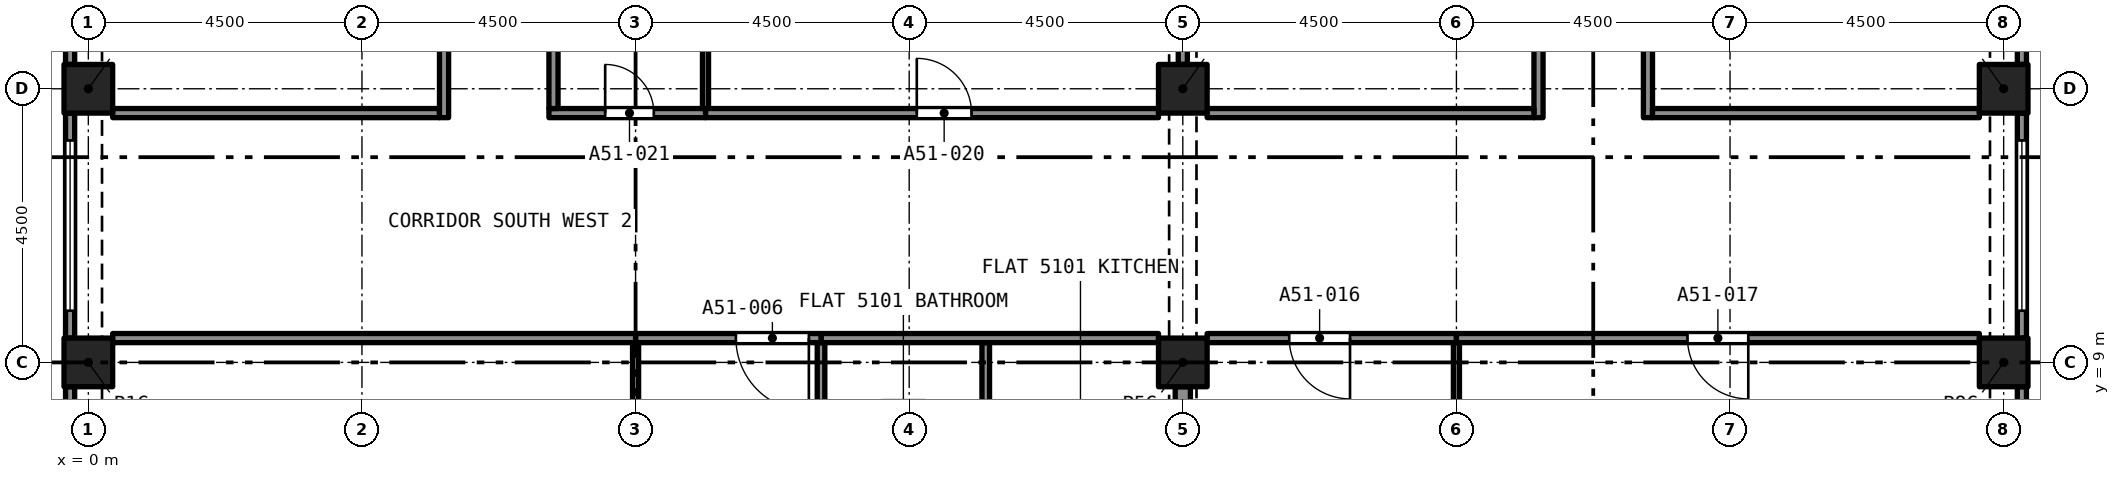
"""IFC4 building model, lengths in metres.
Left out: names, types, materials, properties, quantities, classifications, styles, units other than length and angle.
Written with IfcOpenShell. Run it as: python <this file> out.ifc"""

import sys

from ifc_helpers import new_model, si_unit, direction, frame, frame_2d, origin, origin_2d, place, context, subcontext, project, spatial, rectangle, extrude, element, fill, save


model = new_model("IFC4")
c1 = context("Model", 3, precision=1e-05, world=origin(), true_north=direction((0.0, 1.0)))
c2 = subcontext(c1, "Body", "Model", "MODEL_VIEW")
j1 = project(units=[si_unit("LENGTHUNIT", "METRE"), si_unit("PLANEANGLEUNIT", "RADIAN")], contexts=[c1])
p1 = place(None, origin())
s1 = spatial("IfcSite", under=j1, at=p1, CompositionType="ELEMENT")
p2 = place(p1, origin())
s2 = spatial("IfcBuilding", under=s1, at=p2, CompositionType="ELEMENT")
p3 = place(p2, frame((0.0, 0.0, 185.9)))
s3 = spatial("IfcBuildingStorey", under=s2, at=p3, CompositionType="ELEMENT", Elevation=185.9)
for number, where, z_axis, x_axis in (
    (1, (0.0, 9.0, 0.0), (0.0, 0.0, 1.0), (1.0, 0.0, 0.0)),
    (2, (18.0, 9.0, 0.0), (0.0, 0.0, 1.0), (1.0, 0.0, 0.0)),
    (3, (31.5, 9.0, 0.0), (0.0, 0.0, 1.0), (1.0, 0.0, 0.0)),
    (4, (0.0, 13.5, 0.0), (0.0, 0.0, 1.0), (1.0, 0.0, 0.0)),
    (5, (18.0, 13.5, 0.0), (0.0, 0.0, 1.0), (1.0, 0.0, 0.0)),
    (6, (31.5, 13.5, 0.0), (0.0, 0.0, 1.0), (1.0, 0.0, 0.0)),
):
    element("IfcColumn", number, at=place(p3, frame(where, z_axis=z_axis, x_axis=x_axis)), inside=s3, PredefinedType="COLUMN", context=c2, shape_type="SweptSolid", body=[
        extrude(rectangle(XDim=0.8, YDim=0.8, at=origin_2d()), origin(), (0.0, 0.0, 1.0), 3.2),
    ])
p4 = place(p3, frame((31.8, 8.6, 0.0), z_axis=(0.0, 0.0, 1.0), x_axis=(0.0, -1.0, 0.0)))
e7 = element("IfcWall", 7, at=p4, inside=s3, PredefinedType="SOLIDWALL", context=c2, shape_type="SweptSolid", body=[
    extrude(rectangle(XDim=3.7, YDim=0.15, at=frame_2d((1.85, 0.0))), origin(), (0.0, 0.0, 1.0), 3.2),
])
p5 = place(p4, frame((0.45, 0.0, 0.45)))
e8 = element("IfcOpeningElement", 8, at=p5, cuts=e7, PredefinedType="OPENING", context=c2, shape_type="SweptSolid", body=[
    extrude(rectangle(XDim=2.8, YDim=1.95, at=frame_2d((1.4, 0.975))), frame((0.0, 0.085, 0.0), z_axis=(0.0, -1.0, 0.0), x_axis=(1.0, 0.0, 0.0)), (0.0, 0.0, 1.0), 0.17),
])
p6 = place(p3, frame((31.8, 13.1, 0.0), z_axis=(0.0, 0.0, 1.0), x_axis=(0.0, -1.0, 0.0)))
e9 = element("IfcWall", 9, at=p6, inside=s3, PredefinedType="SOLIDWALL", context=c2, shape_type="SweptSolid", body=[
    extrude(rectangle(XDim=3.7, YDim=0.15, at=frame_2d((1.85, 0.0))), origin(), (0.0, 0.0, 1.0), 3.2),
])
p7 = place(p6, frame((0.45, 0.0, 0.45)))
e10 = element("IfcOpeningElement", 10, at=p7, cuts=e9, PredefinedType="OPENING", context=c2, shape_type="SweptSolid", body=[
    extrude(rectangle(XDim=2.8, YDim=1.95, at=frame_2d((1.4, 0.975))), frame((0.0, 0.085, 0.0), z_axis=(0.0, -1.0, 0.0), x_axis=(1.0, 0.0, 0.0)), (0.0, 0.0, 1.0), 0.17),
])
p8 = place(p3, frame((31.8, 17.6, 0.0), z_axis=(0.0, 0.0, 1.0), x_axis=(0.0, -1.0, 0.0)))
e11 = element("IfcWall", 11, at=p8, inside=s3, PredefinedType="SOLIDWALL", context=c2, shape_type="SweptSolid", body=[
    extrude(rectangle(XDim=3.7, YDim=0.15, at=frame_2d((1.85, 0.0))), origin(), (0.0, 0.0, 1.0), 3.2),
])
p9 = place(p8, frame((0.45, 0.0, 0.45)))
e12 = element("IfcOpeningElement", 12, at=p9, cuts=e11, PredefinedType="OPENING", context=c2, shape_type="SweptSolid", body=[
    extrude(rectangle(XDim=2.8, YDim=1.95, at=frame_2d((1.4, 0.975))), frame((0.0, 0.085, 0.0), z_axis=(0.0, -1.0, 0.0), x_axis=(1.0, 0.0, 0.0)), (0.0, 0.0, 1.0), 0.17),
])
p10 = place(p3, frame((-0.3, 13.9, 0.0), z_axis=(0.0, 0.0, 1.0), x_axis=(0.0, 1.0, 0.0)))
e13 = element("IfcWall", 13, at=p10, inside=s3, PredefinedType="SOLIDWALL", context=c2, shape_type="SweptSolid", body=[
    extrude(rectangle(XDim=3.7, YDim=0.15, at=frame_2d((1.85, 0.0))), origin(), (0.0, 0.0, 1.0), 3.2),
])
p11 = place(p10, frame((0.45, 0.0, 0.45)))
e14 = element("IfcOpeningElement", 14, at=p11, cuts=e13, PredefinedType="OPENING", context=c2, shape_type="SweptSolid", body=[
    extrude(rectangle(XDim=2.8, YDim=1.95, at=frame_2d((1.4, 0.975))), frame((0.0, 0.085, 0.0), z_axis=(0.0, -1.0, 0.0), x_axis=(1.0, 0.0, 0.0)), (0.0, 0.0, 1.0), 0.17),
])
p12 = place(p3, frame((-0.3, 9.4, 0.0), z_axis=(0.0, 0.0, 1.0), x_axis=(0.0, 1.0, 0.0)))
e15 = element("IfcWall", 15, at=p12, inside=s3, PredefinedType="SOLIDWALL", context=c2, shape_type="SweptSolid", body=[
    extrude(rectangle(XDim=3.7, YDim=0.15, at=frame_2d((1.85, 0.0))), origin(), (0.0, 0.0, 1.0), 3.2),
])
p13 = place(p12, frame((0.45, 0.0, 0.45)))
e16 = element("IfcOpeningElement", 16, at=p13, cuts=e15, PredefinedType="OPENING", context=c2, shape_type="SweptSolid", body=[
    extrude(rectangle(XDim=2.8, YDim=1.95, at=frame_2d((1.4, 0.975))), frame((0.0, 0.085, 0.0), z_axis=(0.0, -1.0, 0.0), x_axis=(1.0, 0.0, 0.0)), (0.0, 0.0, 1.0), 0.17),
])
p14 = place(p3, frame((-0.3, 4.9, 0.0), z_axis=(0.0, 0.0, 1.0), x_axis=(0.0, 1.0, 0.0)))
e17 = element("IfcWall", 17, at=p14, inside=s3, PredefinedType="SOLIDWALL", context=c2, shape_type="SweptSolid", body=[
    extrude(rectangle(XDim=3.7, YDim=0.15, at=frame_2d((1.85, 0.0))), origin(), (0.0, 0.0, 1.0), 3.2),
])
p15 = place(p14, frame((0.45, 0.0, 0.45)))
e18 = element("IfcOpeningElement", 18, at=p15, cuts=e17, PredefinedType="OPENING", context=c2, shape_type="SweptSolid", body=[
    extrude(rectangle(XDim=2.8, YDim=1.95, at=frame_2d((1.4, 0.975))), frame((0.0, 0.085, 0.0), z_axis=(0.0, -1.0, 0.0), x_axis=(1.0, 0.0, 0.0)), (0.0, 0.0, 1.0), 0.17),
])
for number, where, z_axis, x_axis in (
    (19, (12.05, 7.052, 0.0), (0.0, 0.0, 1.0), (0.0, 1.0, 0.0)),
    (20, (14.759, 7.052, 0.0), (0.0, 0.0, 1.0), (0.0, 1.0, 0.0)),
):
    element("IfcWall", number, at=place(p3, frame(where, z_axis=z_axis, x_axis=x_axis)), inside=s3, PredefinedType="PARTITIONING", context=c2, shape_type="SweptSolid", body=[
        extrude(rectangle(XDim=2.272, YDim=0.125, at=frame_2d((1.136, 0.0))), origin(), (0.0, 0.0, 1.0), 2.9),
    ])
p16 = place(p3, frame((12.05, 9.4, 0.0), z_axis=(0.0, 0.0, 1.0), x_axis=(1.0, 0.0, 0.0)))
e21 = element("IfcWall", 21, at=p16, inside=s3, PredefinedType="PARTITIONING", context=c2, shape_type="SweptSolid", body=[
    extrude(rectangle(XDim=5.55, YDim=0.15, at=frame_2d((2.775, 0.0))), origin(), (0.0, 0.0, 1.0), 2.9),
])
p17 = place(p3, frame((18.0, 4.9, 0.0), z_axis=(0.0, 0.0, 1.0), x_axis=(0.0, 1.0, 0.0)))
e22 = element("IfcWall", 22, at=p17, inside=s3, PredefinedType="PARTITIONING", context=c2, shape_type="SweptSolid", body=[
    extrude(rectangle(XDim=3.7, YDim=0.25, at=frame_2d((1.85, 0.0))), origin(), (0.0, 0.0, 1.0), 2.38),
])
p18 = place(p3, frame((9.0, 5.65, 0.0), z_axis=(0.0, 0.0, 1.0), x_axis=(0.0, 1.0, 0.0)))
e23 = element("IfcWall", 23, at=p18, inside=s3, PredefinedType="PARTITIONING", context=c2, shape_type="SweptSolid", body=[
    extrude(rectangle(XDim=3.675, YDim=0.1, at=frame_2d((1.837, 0.0))), origin(), (0.0, 0.0, 1.0), 2.9),
])
p19 = place(p18, frame((0.13, 0.0, 0.0)))
e24 = element("IfcOpeningElement", 24, at=p19, cuts=e23, PredefinedType="OPENING", context=c2, shape_type="SweptSolid", body=[
    extrude(rectangle(XDim=1.6, YDim=2.1, at=frame_2d((0.8, 1.05))), frame((0.0, 0.06, 0.0), z_axis=(0.0, -1.0, 0.0), x_axis=(1.0, 0.0, 0.0)), (0.0, 0.0, 1.0), 0.12),
])
p20 = place(p3, frame((12.05, 9.4, 0.0), z_axis=(0.0, 0.0, 1.0), x_axis=(-1.0, 0.0, 0.0)))
e25 = element("IfcWall", 25, at=p20, inside=s3, PredefinedType="PARTITIONING", context=c2, shape_type="SweptSolid", body=[
    extrude(rectangle(XDim=3.05, YDim=0.15, at=frame_2d((1.525, 0.0))), origin(), (0.0, 0.0, 1.0), 2.9),
])
p21 = place(p20, frame((0.2, 0.0, 0.0)))
e26 = element("IfcOpeningElement", 26, at=p21, cuts=e25, PredefinedType="OPENING", context=c2, shape_type="SweptSolid", body=[
    extrude(rectangle(XDim=1.2, YDim=2.4, at=frame_2d((0.6, 1.2))), frame((0.0, 0.085, 0.0), z_axis=(0.0, -1.0, 0.0), x_axis=(1.0, 0.0, 0.0)), (0.0, 0.0, 1.0), 0.17),
])
p22 = place(p3, frame((0.4, 9.4, 0.0), z_axis=(0.0, 0.0, 1.0), x_axis=(1.0, 0.0, 0.0)))
e27 = element("IfcWall", 27, at=p22, inside=s3, PredefinedType="PARTITIONING", context=c2, shape_type="SweptSolid", body=[
    extrude(rectangle(XDim=8.6, YDim=0.15, at=frame_2d((4.3, 0.0))), origin(), (0.0, 0.0, 1.0), 2.9),
])
p23 = place(p3, frame((22.5, 0.4, 0.0), z_axis=(0.0, 0.0, 1.0), x_axis=(0.0, 1.0, 0.0)))
e28 = element("IfcWall", 28, at=p23, inside=s3, PredefinedType="PARTITIONING", context=c2, shape_type="SweptSolid", body=[
    extrude(rectangle(XDim=8.925, YDim=0.1, at=frame_2d((4.462, 0.0))), origin(), (0.0, 0.0, 1.0), 2.75),
])
p24 = place(p3, frame((22.5, 9.4, 0.0), z_axis=(0.0, 0.0, 1.0), x_axis=(-1.0, 0.0, 0.0)))
e29 = element("IfcWall", 29, at=p24, inside=s3, PredefinedType="PARTITIONING", context=c2, shape_type="SweptSolid", body=[
    extrude(rectangle(XDim=4.1, YDim=0.15, at=frame_2d((2.05, 0.0))), origin(), (0.0, 0.0, 1.0), 2.75),
])
p25 = place(p24, frame((1.75, 0.0, 0.0)))
e30 = element("IfcOpeningElement", 30, at=p25, cuts=e29, PredefinedType="OPENING", context=c2, shape_type="SweptSolid", body=[
    extrude(rectangle(XDim=1.0, YDim=2.1, at=frame_2d((0.5, 1.05))), frame((0.0, 0.085, 0.0), z_axis=(0.0, -1.0, 0.0), x_axis=(1.0, 0.0, 0.0)), (0.0, 0.0, 1.0), 0.17),
])
p26 = place(p3, frame((31.1, 9.4, 0.0), z_axis=(0.0, 0.0, 1.0), x_axis=(-1.0, 0.0, 0.0)))
e31 = element("IfcWall", 31, at=p26, inside=s3, PredefinedType="PARTITIONING", context=c2, shape_type="SweptSolid", body=[
    extrude(rectangle(XDim=8.6, YDim=0.15, at=frame_2d((4.3, 0.0))), origin(), (0.0, 0.0, 1.0), 2.75),
])
p27 = place(p26, frame((3.8, 0.0, 0.0)))
e32 = element("IfcOpeningElement", 32, at=p27, cuts=e31, PredefinedType="OPENING", context=c2, shape_type="SweptSolid", body=[
    extrude(rectangle(XDim=1.0, YDim=2.1, at=frame_2d((0.5, 1.05))), frame((0.0, 0.085, 0.0), z_axis=(0.0, -1.0, 0.0), x_axis=(1.0, 0.0, 0.0)), (0.0, 0.0, 1.0), 0.17),
])
p28 = place(p3, frame((23.85, 13.025, 0.0), z_axis=(0.0, 0.0, 1.0), x_axis=(0.0, 1.0, 0.0)))
e33 = element("IfcWall", 33, at=p28, inside=s3, PredefinedType="PARTITIONING", context=c2, shape_type="SweptSolid", body=[
    extrude(rectangle(XDim=9.55, YDim=0.15, at=frame_2d((4.775, 0.0))), origin(), (0.0, 0.0, 1.0), 2.75),
])
p29 = place(p28, frame((4.275, 0.0, 0.0)))
e34 = element("IfcOpeningElement", 34, at=p29, cuts=e33, PredefinedType="OPENING", context=c2, shape_type="SweptSolid", body=[
    extrude(rectangle(XDim=1.0, YDim=2.1, at=frame_2d((0.5, 1.05))), frame((0.0, 0.085, 0.0), z_axis=(0.0, -1.0, 0.0), x_axis=(1.0, 0.0, 0.0)), (0.0, 0.0, 1.0), 0.17),
])
p30 = place(p3, frame((25.65, 22.575, 0.0), z_axis=(0.0, 0.0, 1.0), x_axis=(0.0, -1.0, 0.0)))
e35 = element("IfcWall", 35, at=p30, inside=s3, PredefinedType="PARTITIONING", context=c2, shape_type="SweptSolid", body=[
    extrude(rectangle(XDim=9.55, YDim=0.15, at=frame_2d((4.775, 0.0))), origin(), (0.0, 0.0, 1.0), 2.75),
])
p31 = place(p30, frame((4.275, 0.0, 0.0)))
e36 = element("IfcOpeningElement", 36, at=p31, cuts=e35, PredefinedType="OPENING", context=c2, shape_type="SweptSolid", body=[
    extrude(rectangle(XDim=1.0, YDim=2.1, at=frame_2d((0.5, 1.05))), frame((0.0, 0.085, 0.0), z_axis=(0.0, -1.0, 0.0), x_axis=(1.0, 0.0, 0.0)), (0.0, 0.0, 1.0), 0.17),
])
for number, where, z_axis, x_axis in (
    (37, (18.4, 13.1, 0.0), (0.0, 0.0, 1.0), (1.0, 0.0, 0.0)),
    (38, (25.725, 13.1, 0.0), (0.0, 0.0, 1.0), (1.0, 0.0, 0.0)),
):
    element("IfcWall", number, at=place(p3, frame(where, z_axis=z_axis, x_axis=x_axis)), inside=s3, PredefinedType="PARTITIONING", context=c2, shape_type="SweptSolid", body=[
        extrude(rectangle(XDim=5.375, YDim=0.15, at=frame_2d((2.688, 0.0))), origin(), (0.0, 0.0, 1.0), 2.75),
    ])
p32 = place(p3, frame((10.15, 13.1, 0.0), z_axis=(0.0, 0.0, 1.0), x_axis=(1.0, 0.0, 0.0)))
e39 = element("IfcWall", 39, at=p32, inside=s3, PredefinedType="PARTITIONING", context=c2, shape_type="SweptSolid", body=[
    extrude(rectangle(XDim=7.45, YDim=0.15, at=frame_2d((3.725, 0.0))), origin(), (0.0, 0.0, 1.0), 2.9),
])
p33 = place(p32, frame((3.475, 0.0, 0.0)))
e40 = element("IfcOpeningElement", 40, at=p33, cuts=e39, PredefinedType="OPENING", context=c2, shape_type="SweptSolid", body=[
    extrude(rectangle(XDim=0.9, YDim=2.1, at=frame_2d((0.45, 1.05))), frame((0.0, 0.085, 0.0), z_axis=(0.0, -1.0, 0.0), x_axis=(1.0, 0.0, 0.0)), (0.0, 0.0, 1.0), 0.17),
])
p34 = place(p3, frame((7.575, 13.1, 0.0), z_axis=(0.0, 0.0, 1.0), x_axis=(1.0, 0.0, 0.0)))
e41 = element("IfcWall", 41, at=p34, inside=s3, PredefinedType="PARTITIONING", context=c2, shape_type="SweptSolid", body=[
    extrude(rectangle(XDim=2.575, YDim=0.15, at=frame_2d((1.288, 0.0))), origin(), (0.0, 0.0, 1.0), 2.9),
])
p35 = place(p34, frame((0.925, 0.0, 0.0)))
e42 = element("IfcOpeningElement", 42, at=p35, cuts=e41, PredefinedType="OPENING", context=c2, shape_type="SweptSolid", body=[
    extrude(rectangle(XDim=0.8, YDim=2.1, at=frame_2d((0.4, 1.05))), frame((0.0, 0.085, 0.0), z_axis=(0.0, -1.0, 0.0), x_axis=(1.0, 0.0, 0.0)), (0.0, 0.0, 1.0), 0.17),
])
p36 = place(p3, frame((0.4, 13.1, 0.0), z_axis=(0.0, 0.0, 1.0), x_axis=(1.0, 0.0, 0.0)))
e43 = element("IfcWall", 43, at=p36, inside=s3, PredefinedType="PARTITIONING", context=c2, shape_type="SweptSolid", body=[
    extrude(rectangle(XDim=5.375, YDim=0.15, at=frame_2d((2.688, 0.0))), origin(), (0.0, 0.0, 1.0), 2.9),
])
p37 = place(p3, frame((18.0, 13.9, 0.0), z_axis=(0.0, 0.0, 1.0), x_axis=(0.0, 1.0, 0.0)))
e44 = element("IfcWall", 44, at=p37, inside=s3, PredefinedType="PARTITIONING", context=c2, shape_type="SweptSolid", body=[
    extrude(rectangle(XDim=3.4, YDim=0.15, at=frame_2d((1.7, 0.0))), origin(), (0.0, 0.0, 1.0), 2.38),
])
p38 = place(p3, frame((7.65, 13.175, 0.0), z_axis=(0.0, 0.0, 1.0), x_axis=(0.0, 1.0, 0.0)))
e45 = element("IfcWall", 45, at=p38, inside=s3, PredefinedType="PARTITIONING", context=c2, shape_type="SweptSolid", body=[
    extrude(rectangle(XDim=4.125, YDim=0.15, at=frame_2d((2.062, 0.0))), origin(), (0.0, 0.0, 1.0), 2.9),
])
p39 = place(p3, frame((5.85, 13.025, 0.0), z_axis=(0.0, 0.0, 1.0), x_axis=(0.0, 1.0, 0.0)))
e46 = element("IfcWall", 46, at=p39, inside=s3, PredefinedType="PARTITIONING", context=c2, shape_type="SweptSolid", body=[
    extrude(rectangle(XDim=9.475, YDim=0.15, at=frame_2d((4.738, 0.0))), origin(), (0.0, 0.0, 1.0), 2.9),
])
p40 = place(p39, frame((4.275, 0.0, 0.0)))
e47 = element("IfcOpeningElement", 47, at=p40, cuts=e46, PredefinedType="OPENING", context=c2, shape_type="SweptSolid", body=[
    extrude(rectangle(XDim=1.0, YDim=2.1, at=frame_2d((0.5, 1.05))), frame((0.0, 0.085, 0.0), z_axis=(0.0, -1.0, 0.0), x_axis=(1.0, 0.0, 0.0)), (0.0, 0.0, 1.0), 0.17),
])
p41 = place(p3, frame((10.15, 13.175, 0.0), z_axis=(0.0, 0.0, 1.0), x_axis=(0.0, 1.0, 0.0)))
e48 = element("IfcWall", 48, at=p41, inside=s3, PredefinedType="PARTITIONING", context=c2, shape_type="SweptSolid", body=[
    extrude(rectangle(XDim=4.05, YDim=0.1, at=frame_2d((2.025, 0.0))), origin(), (0.0, 0.0, 1.0), 2.9),
])
p42 = place(p7, origin())
e49 = element("IfcWindow", 49, at=p42, inside=s3, PartitioningType="SINGLE_PANEL", PredefinedType="WINDOW", context=c2, shape_type="SweptSolid", body=[
    extrude(rectangle(XDim=2.8, YDim=1.95, at=frame_2d((1.4, 0.975))), frame((0.0, 0.03, 0.0), z_axis=(0.0, -1.0, 0.0), x_axis=(1.0, 0.0, 0.0)), (0.0, 0.0, 1.0), 0.06),
])
fill(e10, e49)
p43 = place(p13, origin())
e50 = element("IfcWindow", 50, at=p43, inside=s3, PartitioningType="SINGLE_PANEL", PredefinedType="WINDOW", context=c2, shape_type="SweptSolid", body=[
    extrude(rectangle(XDim=2.8, YDim=1.95, at=frame_2d((1.4, 0.975))), frame((0.0, 0.03, 0.0), z_axis=(0.0, -1.0, 0.0), x_axis=(1.0, 0.0, 0.0)), (0.0, 0.0, 1.0), 0.06),
])
fill(e16, e50)
p44 = place(p21, origin())
e51 = element("IfcDoor", 51, at=p44, inside=s3, OperationType="SINGLE_SWING_LEFT", PredefinedType="DOOR", context=c2, shape_type="SweptSolid", body=[
    extrude(rectangle(XDim=1.2, YDim=2.4, at=frame_2d((0.6, 1.2))), frame((0.0, 0.025, 0.0), z_axis=(0.0, -1.0, 0.0), x_axis=(1.0, 0.0, 0.0)), (0.0, 0.0, 1.0), 0.05),
])
fill(e26, e51)
p45 = place(p25, origin())
e52 = element("IfcDoor", 52, at=p45, inside=s3, OperationType="SINGLE_SWING_RIGHT", PredefinedType="DOOR", context=c2, shape_type="SweptSolid", body=[
    extrude(rectangle(XDim=1.0, YDim=2.1, at=frame_2d((0.5, 1.05))), frame((0.0, 0.025, 0.0), z_axis=(0.0, -1.0, 0.0), x_axis=(1.0, 0.0, 0.0)), (0.0, 0.0, 1.0), 0.05),
])
fill(e30, e52)
p46 = place(p27, origin())
e53 = element("IfcDoor", 53, at=p46, inside=s3, OperationType="SINGLE_SWING_RIGHT", PredefinedType="DOOR", context=c2, shape_type="SweptSolid", body=[
    extrude(rectangle(XDim=1.0, YDim=2.1, at=frame_2d((0.5, 1.05))), frame((0.0, 0.025, 0.0), z_axis=(0.0, -1.0, 0.0), x_axis=(1.0, 0.0, 0.0)), (0.0, 0.0, 1.0), 0.05),
])
fill(e32, e53)
p47 = place(p33, origin())
e54 = element("IfcDoor", 54, at=p47, inside=s3, OperationType="SINGLE_SWING_RIGHT", PredefinedType="DOOR", context=c2, shape_type="SweptSolid", body=[
    extrude(rectangle(XDim=0.9, YDim=2.1, at=frame_2d((0.45, 1.05))), frame((0.0, 0.025, 0.0), z_axis=(0.0, -1.0, 0.0), x_axis=(1.0, 0.0, 0.0)), (0.0, 0.0, 1.0), 0.05),
])
fill(e40, e54)
p48 = place(p35, origin())
e55 = element("IfcDoor", 55, at=p48, inside=s3, OperationType="SINGLE_SWING_RIGHT", PredefinedType="DOOR", context=c2, shape_type="SweptSolid", body=[
    extrude(rectangle(XDim=0.8, YDim=2.1, at=frame_2d((0.4, 1.05))), frame((0.0, 0.025, 0.0), z_axis=(0.0, -1.0, 0.0), x_axis=(1.0, 0.0, 0.0)), (0.0, 0.0, 1.0), 0.05),
])
fill(e42, e55)
save(model, sys.argv[1])
